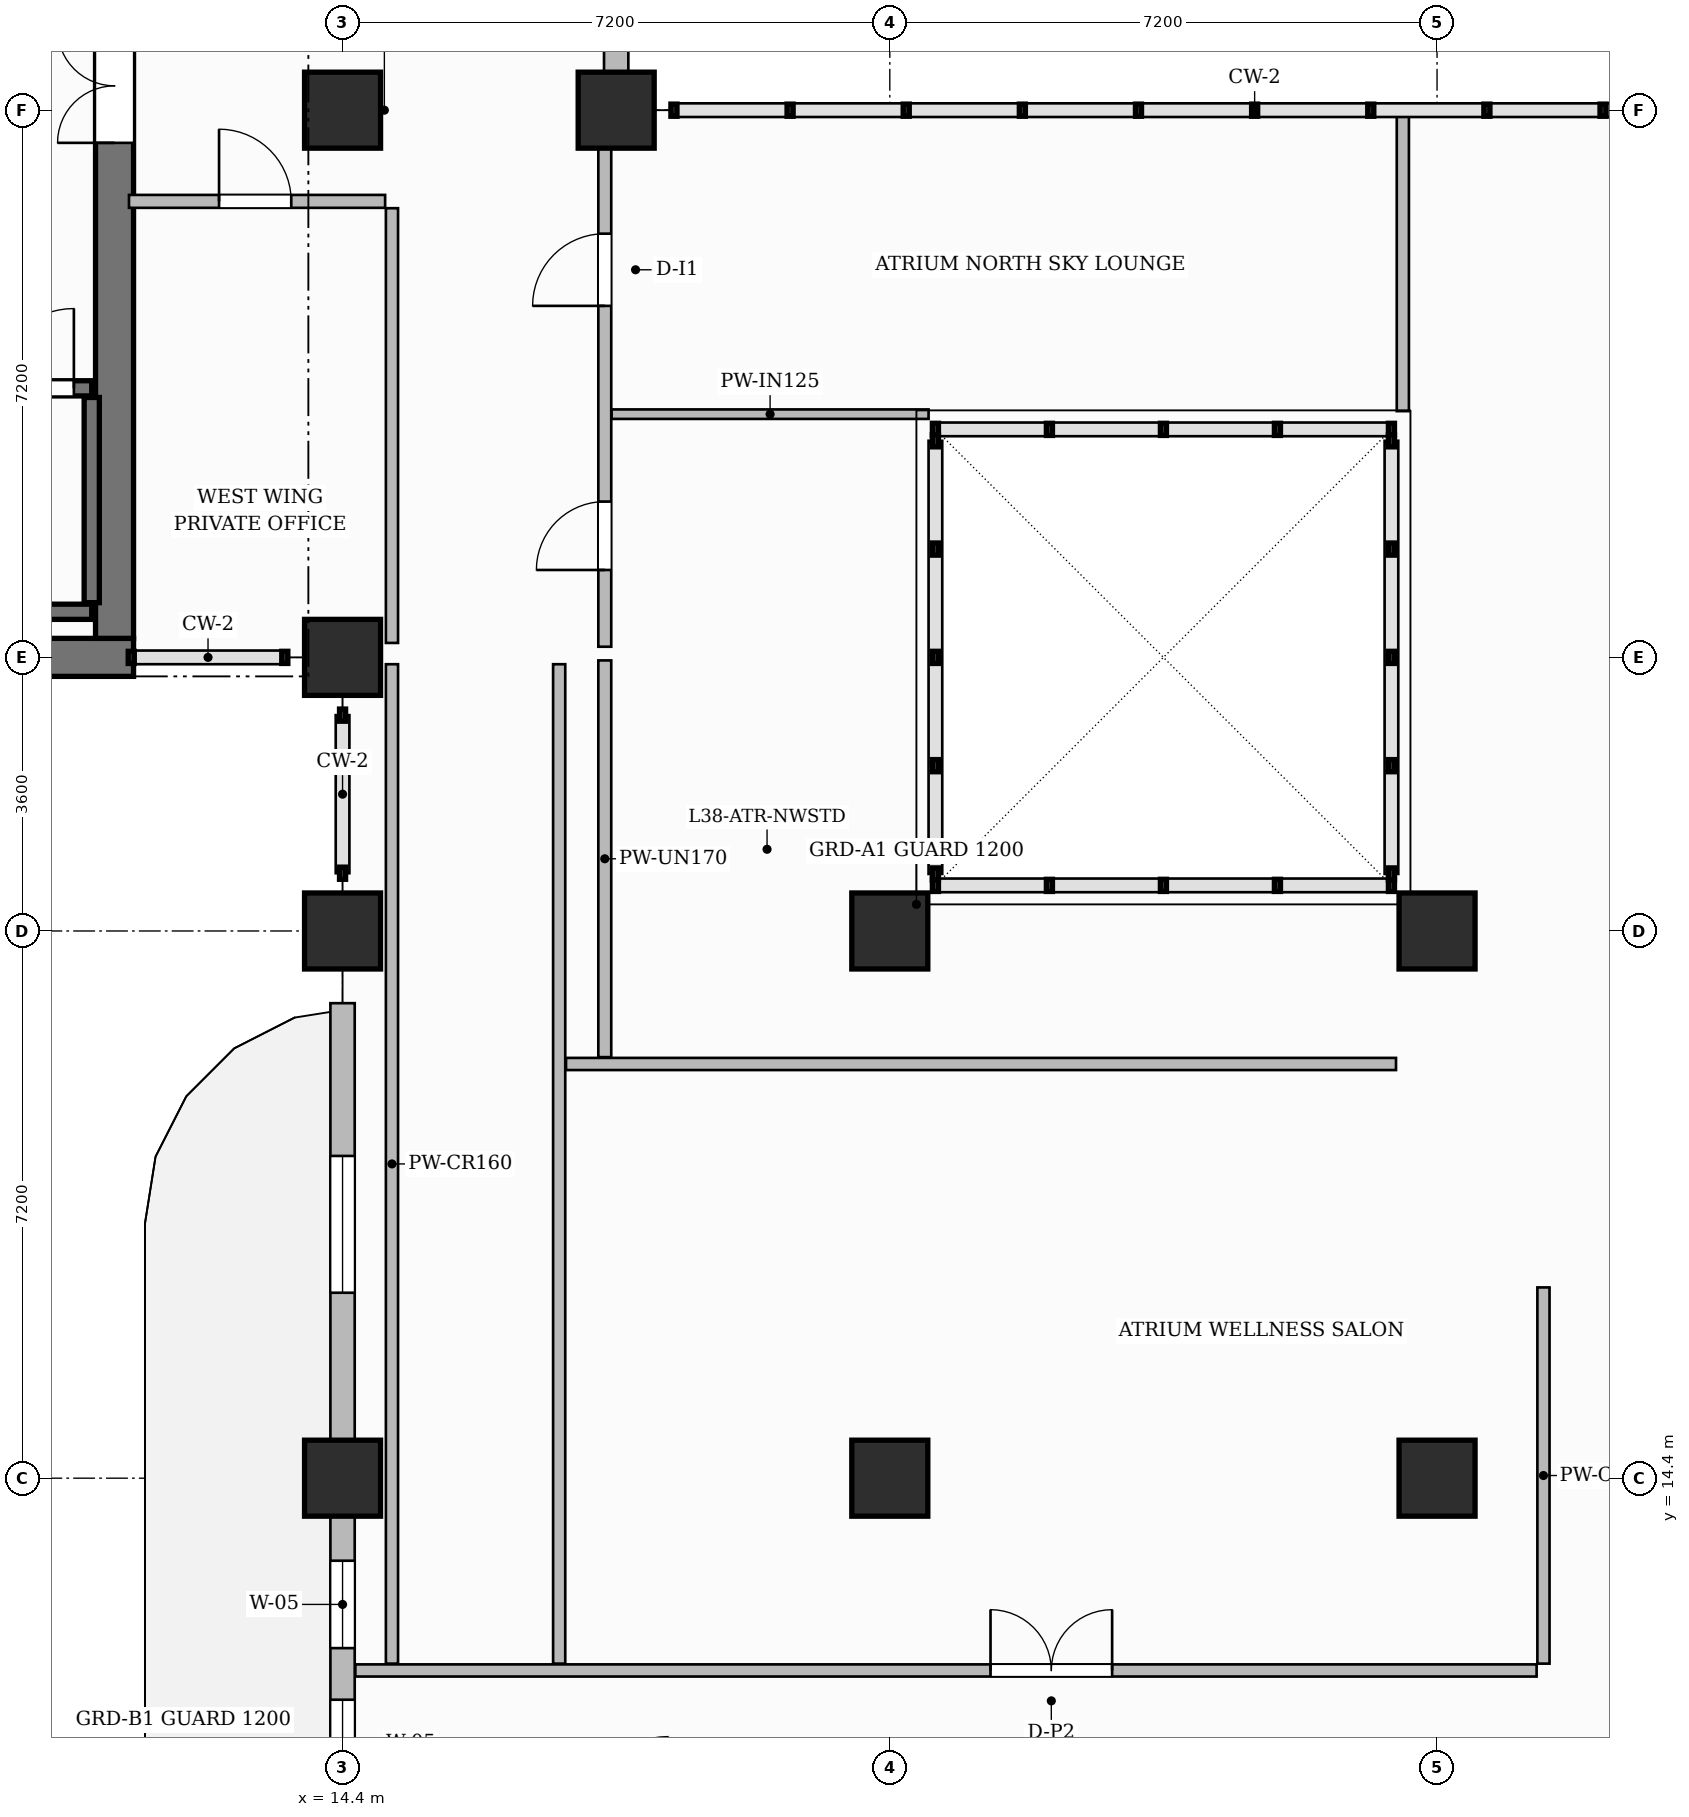
"""IFC4 building model, lengths in metres.
Left out: names, types, materials, properties, quantities, classifications, styles, units other than length and angle.
Written with IfcOpenShell. Run it as: python <this file> out.ifc"""

import sys

from ifc_helpers import new_model, si_unit, direction, frame, frame_2d, origin, origin_2d, place, context, subcontext, project, spatial, rectangle, extrude, source, transform, mapped, element, fill, save


model = new_model("IFC4")
c1 = context("Model", 3, precision=1e-05, world=origin(), true_north=direction((0.0, 1.0)))
c2 = subcontext(c1, "Body", "Model", "MODEL_VIEW")
j1 = project(units=[si_unit("LENGTHUNIT", "METRE"), si_unit("PLANEANGLEUNIT", "RADIAN")], contexts=[c1])
p1 = place(None, origin())
s1 = spatial("IfcSite", under=j1, at=p1, CompositionType="ELEMENT")
p2 = place(p1, origin())
s2 = spatial("IfcBuilding", under=s1, at=p2, CompositionType="ELEMENT")
p3 = place(p2, frame((0.0, 0.0, 154.15)))
s3 = spatial("IfcBuildingStorey", under=s2, at=p3, CompositionType="ELEMENT", Elevation=154.15)
p4 = place(p3, frame((3.35, 25.2, 0.0), z_axis=(0.0, 0.0, 1.0), x_axis=(1.0, 0.0, 0.0)))
e1 = element("IfcWall", 1, at=p4, inside=s3, PredefinedType="SHEAR", context=c2, shape_type="SweptSolid", body=[
    extrude(rectangle(XDim=8.3, YDim=0.5, at=frame_2d((4.15, 0.0))), origin(), (0.0, 0.0, 1.0), 3.85),
])
p5 = place(p3, frame((11.4, 25.45, 0.0), z_axis=(0.0, 0.0, 1.0), x_axis=(0.0, 1.0, 0.0)))
e2 = element("IfcWall", 2, at=p5, inside=s3, PredefinedType="SHEAR", context=c2, shape_type="SweptSolid", body=[
    extrude(rectangle(XDim=13.9, YDim=0.5, at=frame_2d((6.95, 0.0))), origin(), (0.0, 0.0, 1.0), 3.85),
])
p6 = place(p5, frame((6.52, 0.0, 0.0)))
e3 = element("IfcOpeningElement", 3, at=p6, cuts=e2, PredefinedType="OPENING", context=c2, shape_type="SweptSolid", body=[
    extrude(rectangle(XDim=1.5, YDim=2.2, at=frame_2d((0.75, 1.1))), frame((0.0, 0.26, 0.0), z_axis=(0.0, -1.0, 0.0), x_axis=(1.0, 0.0, 0.0)), (0.0, 0.0, 1.0), 0.52),
])
m1 = source(origin(), c2, "Body", "SweptSolid", [
    extrude(rectangle(XDim=1.0, YDim=1.0, at=origin_2d()), origin(), (0.0, 0.0, 1.0), 3.85),
])
for number, where, z_axis, x_axis in (
    (4, (14.4, 14.4, 0.0), (0.0, 0.0, 1.0), (1.0, 0.0, 0.0)),
    (5, (14.4, 21.6, 0.0), (0.0, 0.0, 1.0), (1.0, 0.0, 0.0)),
    (6, (14.4, 25.2, 0.0), (0.0, 0.0, 1.0), (1.0, 0.0, 0.0)),
    (7, (14.4, 32.4, 0.0), (0.0, 0.0, 1.0), (1.0, 0.0, 0.0)),
    (8, (21.6, 14.4, 0.0), (0.0, 0.0, 1.0), (1.0, 0.0, 0.0)),
    (9, (21.6, 21.6, 0.0), (0.0, 0.0, 1.0), (1.0, 0.0, 0.0)),
    (10, (28.8, 14.4, 0.0), (0.0, 0.0, 1.0), (1.0, 0.0, 0.0)),
    (11, (28.8, 21.6, 0.0), (0.0, 0.0, 1.0), (1.0, 0.0, 0.0)),
    (12, (18.0, 32.4, 0.0), (0.0, 0.0, 1.0), (1.0, 0.0, 0.0)),
):
    element("IfcColumn", number, at=place(p3, frame(where, z_axis=z_axis, x_axis=x_axis)), inside=s3, PredefinedType="COLUMN", context=c2, shape_type="MappedRepresentation", body=[
        mapped(m1, transform((0.0, 0.0, 0.0), scale=1.0)),
    ])
p7 = place(p3, frame((4.0, 25.8, 0.0), z_axis=(0.0, 0.0, 1.0), x_axis=(1.0, 0.0, 0.0)))
e13 = element("IfcWall", 13, at=p7, inside=s3, PredefinedType="SHEAR", context=c2, shape_type="SweptSolid", body=[
    extrude(rectangle(XDim=7.1, YDim=0.2, at=frame_2d((3.55, 0.0))), origin(), (0.0, 0.0, 1.0), 3.85),
])
p8 = place(p3, frame((11.1, 25.92, 0.0), z_axis=(0.0, 0.0, 1.0), x_axis=(0.0, 1.0, 0.0)))
e14 = element("IfcWall", 14, at=p8, inside=s3, PredefinedType="SHEAR", context=c2, shape_type="SweptSolid", body=[
    extrude(rectangle(XDim=2.7, YDim=0.2, at=frame_2d((1.35, 0.0))), origin(), (0.0, 0.0, 1.0), 3.85),
])
p9 = place(p3, frame((4.0, 28.74, 0.0), z_axis=(0.0, 0.0, 1.0), x_axis=(1.0, 0.0, 0.0)))
e15 = element("IfcWall", 15, at=p9, inside=s3, PredefinedType="SHEAR", context=c2, shape_type="SweptSolid", body=[
    extrude(rectangle(XDim=7.1, YDim=0.2, at=frame_2d((3.55, 0.0))), origin(), (0.0, 0.0, 1.0), 3.85),
])
p10 = place(p9, frame((5.815, 0.0, 0.0)))
e16 = element("IfcOpeningElement", 16, at=p10, cuts=e15, PredefinedType="OPENING", context=c2, shape_type="SweptSolid", body=[
    extrude(rectangle(XDim=1.05, YDim=2.2, at=frame_2d((0.525, 1.1))), frame((0.0, 0.11, 0.0), z_axis=(0.0, -1.0, 0.0), x_axis=(1.0, 0.0, 0.0)), (0.0, 0.0, 1.0), 0.22),
])
p11 = place(p3, frame((14.568, 11.87, 0.0), z_axis=(0.0, 0.0, 1.0), x_axis=(1.0, 0.0, 0.0)))
e17 = element("IfcWall", 17, at=p11, inside=s3, PredefinedType="PARTITIONING", context=c2, shape_type="SweptSolid", body=[
    extrude(rectangle(XDim=15.542, YDim=0.16, at=frame_2d((7.771, 0.0))), origin(), (0.0, 0.0, 1.0), 3.6),
])
p12 = place(p11, frame((8.357, 0.0, 0.0)))
e18 = element("IfcOpeningElement", 18, at=p12, cuts=e17, PredefinedType="OPENING", context=c2, shape_type="SweptSolid", body=[
    extrude(rectangle(XDim=1.6, YDim=2.4, at=frame_2d((0.8, 1.2))), frame((0.0, 0.09, 0.0), z_axis=(0.0, -1.0, 0.0), x_axis=(1.0, 0.0, 0.0)), (0.0, 0.0, 1.0), 0.18),
])
p13 = place(p3, frame((30.2, 11.96, 0.0), z_axis=(0.0, 0.0, 1.0), x_axis=(0.0, 1.0, 0.0)))
e19 = element("IfcWall", 19, at=p13, inside=s3, PredefinedType="PARTITIONING", context=c2, shape_type="SweptSolid", body=[
    extrude(rectangle(XDim=4.95, YDim=0.16, at=frame_2d((2.475, 0.0))), origin(), (0.0, 0.0, 1.0), 3.6),
])
for number, where, z_axis, x_axis in (
    (20, (15.05, 11.96, 0.0), (0.0, 0.0, 1.0), (0.0, 1.0, 0.0)),
    (21, (17.25, 11.96, 0.0), (0.0, 0.0, 1.0), (0.0, 1.0, 0.0)),
):
    element("IfcWall", number, at=place(p3, frame(where, z_axis=z_axis, x_axis=x_axis)), inside=s3, PredefinedType="PARTITIONING", context=c2, shape_type="SweptSolid", body=[
        extrude(rectangle(XDim=13.15, YDim=0.16, at=frame_2d((6.575, 0.0))), origin(), (0.0, 0.0, 1.0), 3.6),
    ])
p14 = place(p3, frame((15.05, 25.39, 0.0), z_axis=(0.0, 0.0, 1.0), x_axis=(0.0, 1.0, 0.0)))
e22 = element("IfcWall", 22, at=p14, inside=s3, PredefinedType="PARTITIONING", context=c2, shape_type="SweptSolid", body=[
    extrude(rectangle(XDim=5.72, YDim=0.16, at=frame_2d((2.86, 0.0))), origin(), (0.0, 0.0, 1.0), 3.6),
])
p15 = place(p3, frame((11.59, 31.2, 0.0), z_axis=(0.0, 0.0, 1.0), x_axis=(1.0, 0.0, 0.0)))
e23 = element("IfcWall", 23, at=p15, inside=s3, PredefinedType="PARTITIONING", context=c2, shape_type="SweptSolid", body=[
    extrude(rectangle(XDim=3.37, YDim=0.17, at=frame_2d((1.685, 0.0))), origin(), (0.0, 0.0, 1.0), 3.6),
])
p16 = place(p15, frame((1.185, 0.0, 0.0)))
e24 = element("IfcOpeningElement", 24, at=p16, cuts=e23, PredefinedType="OPENING", context=c2, shape_type="SweptSolid", body=[
    extrude(rectangle(XDim=0.95, YDim=2.15, at=frame_2d((0.475, 1.075))), frame((0.0, 0.095, 0.0), z_axis=(0.0, -1.0, 0.0), x_axis=(1.0, 0.0, 0.0)), (0.0, 0.0, 1.0), 0.19),
])
p17 = place(p3, frame((17.85, 19.94, 0.0), z_axis=(0.0, 0.0, 1.0), x_axis=(0.0, 1.0, 0.0)))
e25 = element("IfcWall", 25, at=p17, inside=s3, PredefinedType="PARTITIONING", context=c2, shape_type="SweptSolid", body=[
    extrude(rectangle(XDim=5.22, YDim=0.17, at=frame_2d((2.61, 0.0))), origin(), (0.0, 0.0, 1.0), 3.285),
])
p18 = place(p3, frame((17.85, 25.34, 0.0), z_axis=(0.0, 0.0, 1.0), x_axis=(0.0, 1.0, 0.0)))
e26 = element("IfcWall", 26, at=p18, inside=s3, PredefinedType="PARTITIONING", context=c2, shape_type="SweptSolid", body=[
    extrude(rectangle(XDim=6.87, YDim=0.17, at=frame_2d((3.435, 0.0))), origin(), (0.0, 0.0, 1.0), 3.6),
])
p19 = place(p18, frame((1.01, 0.0, 0.0)))
e27 = element("IfcOpeningElement", 27, at=p19, cuts=e26, PredefinedType="OPENING", context=c2, shape_type="SweptSolid", body=[
    extrude(rectangle(XDim=0.9, YDim=2.15, at=frame_2d((0.45, 1.075))), frame((0.0, 0.095, 0.0), z_axis=(0.0, -1.0, 0.0), x_axis=(1.0, 0.0, 0.0)), (0.0, 0.0, 1.0), 0.19),
])
p20 = place(p18, frame((4.485, 0.0, 0.0)))
e28 = element("IfcOpeningElement", 28, at=p20, cuts=e26, PredefinedType="OPENING", context=c2, shape_type="SweptSolid", body=[
    extrude(rectangle(XDim=0.95, YDim=2.15, at=frame_2d((0.475, 1.075))), frame((0.0, 0.095, 0.0), z_axis=(0.0, -1.0, 0.0), x_axis=(1.0, 0.0, 0.0)), (0.0, 0.0, 1.0), 0.19),
])
p21 = place(p3, frame((28.35, 28.44, 0.0), z_axis=(0.0, 0.0, 1.0), x_axis=(0.0, 1.0, 0.0)))
e29 = element("IfcWall", 29, at=p21, inside=s3, PredefinedType="PARTITIONING", context=c2, shape_type="SweptSolid", body=[
    extrude(rectangle(XDim=3.932, YDim=0.16, at=frame_2d((1.966, 0.0))), origin(), (0.0, 0.0, 1.0), 3.6),
])
p22 = place(p3, frame((17.94, 28.4, 0.0), z_axis=(0.0, 0.0, 1.0), x_axis=(1.0, 0.0, 0.0)))
e30 = element("IfcWall", 30, at=p22, inside=s3, PredefinedType="PARTITIONING", context=c2, shape_type="SweptSolid", body=[
    extrude(rectangle(XDim=4.17, YDim=0.125, at=frame_2d((2.085, 0.0))), origin(), (0.0, 0.0, 1.0), 3.6),
])
p23 = place(p3, frame((17.34, 19.85, 0.0), z_axis=(0.0, 0.0, 1.0), x_axis=(1.0, 0.0, 0.0)))
e31 = element("IfcWall", 31, at=p23, inside=s3, PredefinedType="PARTITIONING", context=c2, shape_type="SweptSolid", body=[
    extrude(rectangle(XDim=10.92, YDim=0.16, at=frame_2d((5.46, 0.0))), origin(), (0.0, 0.0, 1.0), 3.6),
])
p24 = place(p3, frame((14.4, 0.05, 0.0), z_axis=(0.0, 0.0, 1.0), x_axis=(0.0, 1.0, 0.0)))
e32 = element("IfcWall", 32, at=p24, inside=s3, PredefinedType="SOLIDWALL", context=c2, shape_type="SweptSolid", body=[
    extrude(rectangle(XDim=20.6, YDim=0.32, at=frame_2d((10.3, 0.0))), origin(), (0.0, 0.0, 1.0), 3.085),
])
p25 = place(p24, frame((3.4, 0.0, 0.0)))
e33 = element("IfcOpeningElement", 33, at=p25, cuts=e32, PredefinedType="OPENING", context=c2, shape_type="SweptSolid", body=[
    extrude(rectangle(XDim=1.2, YDim=2.2, at=frame_2d((0.6, 1.1))), frame((0.0, 0.17, 0.0), z_axis=(0.0, -1.0, 0.0), x_axis=(1.0, 0.0, 0.0)), (0.0, 0.0, 1.0), 0.34),
])
p26 = place(p24, frame((1.225, 0.0, 0.8)))
e34 = element("IfcOpeningElement", 34, at=p26, cuts=e32, PredefinedType="OPENING", context=c2, shape_type="SweptSolid", body=[
    extrude(rectangle(XDim=1.4, YDim=1.85, at=frame_2d((0.7, 0.925))), frame((0.0, 0.17, 0.0), z_axis=(0.0, -1.0, 0.0), x_axis=(1.0, 0.0, 0.0)), (0.0, 0.0, 1.0), 0.34),
])
p27 = place(p24, frame((5.154, 0.0, 0.8)))
e35 = element("IfcOpeningElement", 35, at=p27, cuts=e32, PredefinedType="OPENING", context=c2, shape_type="SweptSolid", body=[
    extrude(rectangle(XDim=0.95, YDim=1.75, at=frame_2d((0.475, 0.875))), frame((0.0, 0.17, 0.0), z_axis=(0.0, -1.0, 0.0), x_axis=(1.0, 0.0, 0.0)), (0.0, 0.0, 1.0), 0.34),
])
p28 = place(p24, frame((8.346, 0.0, 0.8)))
e36 = element("IfcOpeningElement", 36, at=p28, cuts=e32, PredefinedType="OPENING", context=c2, shape_type="SweptSolid", body=[
    extrude(rectangle(XDim=1.15, YDim=1.8, at=frame_2d((0.575, 0.9))), frame((0.0, 0.17, 0.0), z_axis=(0.0, -1.0, 0.0), x_axis=(1.0, 0.0, 0.0)), (0.0, 0.0, 1.0), 0.34),
])
p29 = place(p24, frame((10.285, 0.0, 0.8)))
e37 = element("IfcOpeningElement", 37, at=p29, cuts=e32, PredefinedType="OPENING", context=c2, shape_type="SweptSolid", body=[
    extrude(rectangle(XDim=1.15, YDim=1.8, at=frame_2d((0.575, 0.9))), frame((0.0, 0.17, 0.0), z_axis=(0.0, -1.0, 0.0), x_axis=(1.0, 0.0, 0.0)), (0.0, 0.0, 1.0), 0.34),
])
p30 = place(p24, frame((12.114, 0.0, 0.8)))
e38 = element("IfcOpeningElement", 38, at=p30, cuts=e32, PredefinedType="OPENING", context=c2, shape_type="SweptSolid", body=[
    extrude(rectangle(XDim=1.15, YDim=1.8, at=frame_2d((0.575, 0.9))), frame((0.0, 0.17, 0.0), z_axis=(0.0, -1.0, 0.0), x_axis=(1.0, 0.0, 0.0)), (0.0, 0.0, 1.0), 0.34),
])
p31 = place(p24, frame((16.79, 0.0, 0.8)))
e39 = element("IfcOpeningElement", 39, at=p31, cuts=e32, PredefinedType="OPENING", context=c2, shape_type="SweptSolid", body=[
    extrude(rectangle(XDim=1.8, YDim=1.85, at=frame_2d((0.9, 0.925))), frame((0.0, 0.17, 0.0), z_axis=(0.0, -1.0, 0.0), x_axis=(1.0, 0.0, 0.0)), (0.0, 0.0, 1.0), 0.34),
])
p32 = place(p3, frame((18.0, 32.4, 0.0), z_axis=(0.0, 0.0, 1.0), x_axis=(0.0, 1.0, 0.0)))
e40 = element("IfcWall", 40, at=p32, inside=s3, PredefinedType="SOLIDWALL", context=c2, shape_type="SweptSolid", body=[
    extrude(rectangle(XDim=14.35, YDim=0.32, at=frame_2d((7.175, 0.0))), origin(), (0.0, 0.0, 1.0), 3.6),
])
p33 = place(p32, frame((0.85, 0.0, 0.0)))
e41 = element("IfcOpeningElement", 41, at=p33, cuts=e40, PredefinedType="OPENING", context=c2, shape_type="SweptSolid", body=[
    extrude(rectangle(XDim=1.2, YDim=2.2, at=frame_2d((0.6, 1.1))), frame((0.0, 0.17, 0.0), z_axis=(0.0, -1.0, 0.0), x_axis=(1.0, 0.0, 0.0)), (0.0, 0.0, 1.0), 0.34),
])
p34 = place(p32, frame((3.475, 0.0, 0.8)))
e42 = element("IfcOpeningElement", 42, at=p34, cuts=e40, PredefinedType="OPENING", context=c2, shape_type="SweptSolid", body=[
    extrude(rectangle(XDim=1.8, YDim=1.85, at=frame_2d((0.9, 0.925))), frame((0.0, 0.17, 0.0), z_axis=(0.0, -1.0, 0.0), x_axis=(1.0, 0.0, 0.0)), (0.0, 0.0, 1.0), 0.34),
])
p35 = place(p32, frame((8.525, 0.0, 0.8)))
e43 = element("IfcOpeningElement", 43, at=p35, cuts=e40, PredefinedType="OPENING", context=c2, shape_type="SweptSolid", body=[
    extrude(rectangle(XDim=1.8, YDim=1.85, at=frame_2d((0.9, 0.925))), frame((0.0, 0.17, 0.0), z_axis=(0.0, -1.0, 0.0), x_axis=(1.0, 0.0, 0.0)), (0.0, 0.0, 1.0), 0.34),
])
p36 = place(p32, frame((11.275, 0.0, 0.8)))
e44 = element("IfcOpeningElement", 44, at=p36, cuts=e40, PredefinedType="OPENING", context=c2, shape_type="SweptSolid", body=[
    extrude(rectangle(XDim=1.8, YDim=1.85, at=frame_2d((0.9, 0.925))), frame((0.0, 0.17, 0.0), z_axis=(0.0, -1.0, 0.0), x_axis=(1.0, 0.0, 0.0)), (0.0, 0.0, 1.0), 0.34),
])
m2 = source(origin(), c2, "Body", "SweptSolid", [
    extrude(rectangle(XDim=1.05, YDim=2.2, at=frame_2d((0.525, 1.1))), frame((0.0, 0.025, 0.0), z_axis=(0.0, -1.0, 0.0), x_axis=(1.0, 0.0, 0.0)), (0.0, 0.0, 1.0), 0.05),
])
p37 = place(p10, origin())
e45 = element("IfcDoor", 45, at=p37, inside=s3, OperationType="SINGLE_SWING_RIGHT", PredefinedType="DOOR", context=c2, shape_type="MappedRepresentation", body=[
    mapped(m2, transform((0.0, 0.0, 0.0), scale=1.0)),
])
fill(e16, e45)
m3 = source(origin(), c2, "Body", "SweptSolid", [
    extrude(rectangle(XDim=1.5, YDim=2.2, at=frame_2d((0.75, 1.1))), frame((0.0, 0.025, 0.0), z_axis=(0.0, -1.0, 0.0), x_axis=(1.0, 0.0, 0.0)), (0.0, 0.0, 1.0), 0.05),
])
p38 = place(p6, origin())
e46 = element("IfcDoor", 46, at=p38, inside=s3, OperationType="DOUBLE_DOOR_SINGLE_SWING", PredefinedType="DOOR", context=c2, shape_type="MappedRepresentation", body=[
    mapped(m3, transform((0.0, 0.0, 0.0), scale=1.0)),
])
fill(e3, e46)
m4 = source(origin(), c2, "Body", "SweptSolid", [
    extrude(rectangle(XDim=0.95, YDim=2.15, at=frame_2d((0.475, 1.075))), frame((0.0, 0.025, 0.0), z_axis=(0.0, -1.0, 0.0), x_axis=(1.0, 0.0, 0.0)), (0.0, 0.0, 1.0), 0.05),
])
p39 = place(p16, origin())
e47 = element("IfcDoor", 47, at=p39, inside=s3, OperationType="SINGLE_SWING_LEFT", PredefinedType="DOOR", context=c2, shape_type="MappedRepresentation", body=[
    mapped(m4, transform((0.0, 0.0, 0.0), scale=1.0)),
])
fill(e24, e47)
m5 = source(origin(), c2, "Body", "SweptSolid", [
    extrude(rectangle(XDim=0.9, YDim=2.15, at=frame_2d((0.45, 1.075))), frame((0.0, 0.025, 0.0), z_axis=(0.0, -1.0, 0.0), x_axis=(1.0, 0.0, 0.0)), (0.0, 0.0, 1.0), 0.05),
])
p40 = place(p19, origin())
e48 = element("IfcDoor", 48, at=p40, inside=s3, OperationType="SINGLE_SWING_LEFT", PredefinedType="DOOR", context=c2, shape_type="MappedRepresentation", body=[
    mapped(m5, transform((0.0, 0.0, 0.0), scale=1.0)),
])
fill(e27, e48)
p41 = place(p20, origin())
e49 = element("IfcDoor", 49, at=p41, inside=s3, OperationType="SINGLE_SWING_LEFT", PredefinedType="DOOR", context=c2, shape_type="MappedRepresentation", body=[
    mapped(m4, transform((0.0, 0.0, 0.0), scale=1.0)),
])
fill(e28, e49)
m6 = source(origin(), c2, "Body", "SweptSolid", [
    extrude(rectangle(XDim=1.6, YDim=2.4, at=frame_2d((0.8, 1.2))), frame((0.0, 0.025, 0.0), z_axis=(0.0, -1.0, 0.0), x_axis=(1.0, 0.0, 0.0)), (0.0, 0.0, 1.0), 0.05),
])
p42 = place(p12, origin())
e50 = element("IfcDoor", 50, at=p42, inside=s3, OperationType="DOUBLE_DOOR_SINGLE_SWING", PredefinedType="DOOR", context=c2, shape_type="MappedRepresentation", body=[
    mapped(m6, transform((0.0, 0.0, 0.0), scale=1.0)),
])
fill(e18, e50)
m7 = source(origin(), c2, "Body", "SweptSolid", [
    extrude(rectangle(XDim=1.15, YDim=1.8, at=frame_2d((0.575, 0.9))), frame((0.0, 0.03, 0.0), z_axis=(0.0, -1.0, 0.0), x_axis=(1.0, 0.0, 0.0)), (0.0, 0.0, 1.0), 0.06),
])
p43 = place(p29, origin())
e51 = element("IfcWindow", 51, at=p43, inside=s3, PartitioningType="SINGLE_PANEL", PredefinedType="WINDOW", context=c2, shape_type="MappedRepresentation", body=[
    mapped(m7, transform((0.0, 0.0, 0.0), scale=1.0)),
])
fill(e37, e51)
p44 = place(p30, origin())
e52 = element("IfcWindow", 52, at=p44, inside=s3, PartitioningType="SINGLE_PANEL", PredefinedType="WINDOW", context=c2, shape_type="MappedRepresentation", body=[
    mapped(m7, transform((0.0, 0.0, 0.0), scale=1.0)),
])
fill(e38, e52)
m8 = source(origin(), c2, "Body", "SweptSolid", [
    extrude(rectangle(XDim=1.8, YDim=1.85, at=frame_2d((0.9, 0.925))), frame((0.0, 0.03, 0.0), z_axis=(0.0, -1.0, 0.0), x_axis=(1.0, 0.0, 0.0)), (0.0, 0.0, 1.0), 0.06),
])
p45 = place(p31, origin())
e53 = element("IfcWindow", 53, at=p45, inside=s3, PartitioningType="DOUBLE_PANEL_VERTICAL", PredefinedType="WINDOW", context=c2, shape_type="MappedRepresentation", body=[
    mapped(m8, transform((0.0, 0.0, 0.0), scale=1.0)),
])
fill(e39, e53)
save(model, sys.argv[1])
